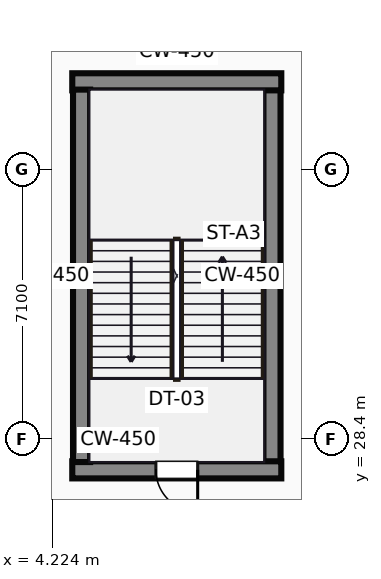
"""IFC4 building model, lengths in metres.
Left out: names, types, materials, properties, quantities, classifications, styles, units other than length and angle.
Written with IfcOpenShell. Run it as: python <this file> out.ifc"""

import sys

from ifc_helpers import new_model, si_unit, direction, frame, frame_2d, origin, place, context, subcontext, project, spatial, rectangle, extrude, source, transform, mapped, element, fill, save


model = new_model("IFC4")
c1 = context("Model", 3, precision=1e-05, world=origin(), true_north=direction((0.0, 1.0)))
c2 = subcontext(c1, "Body", "Model", "MODEL_VIEW")
j1 = project(units=[si_unit("LENGTHUNIT", "METRE"), si_unit("PLANEANGLEUNIT", "RADIAN")], contexts=[c1])
p1 = place(None, origin())
s1 = spatial("IfcSite", under=j1, at=p1, CompositionType="ELEMENT")
p2 = place(p1, origin())
s2 = spatial("IfcBuilding", under=s1, at=p2, CompositionType="ELEMENT")
p3 = place(p2, frame((0.0, 0.0, 16.0)))
s3 = spatial("IfcBuildingStorey", under=s2, at=p3, CompositionType="ELEMENT", Elevation=16.0)
m1 = source(origin(), c2, "Body", "SweptSolid", [
    extrude(rectangle(XDim=5.5, YDim=0.45, at=frame_2d((2.75, 0.0))), origin(), (0.0, 0.0, 1.0), 5.0),
])
p4 = place(p3, frame((4.75, 27.595, 0.0), z_axis=(0.0, 0.0, 1.0), x_axis=(1.0, 0.0, 0.0)))
e1 = element("IfcWall", 1, at=p4, inside=s3, PredefinedType="SHEAR", context=c2, shape_type="MappedRepresentation", body=[
    mapped(m1, transform((0.0, 0.0, 0.0))),
])
p5 = place(p4, frame((2.2, 0.0, 0.0)))
e2 = element("IfcOpeningElement", 2, at=p5, cuts=e1, PredefinedType="OPENING", context=c2, shape_type="SweptSolid", body=[
    extrude(rectangle(XDim=1.1, YDim=2.15, at=frame_2d((0.55, 1.075))), frame((0.0, 0.235, 0.0), z_axis=(0.0, -1.0, 0.0), x_axis=(1.0, 0.0, 0.0)), (0.0, 0.0, 1.0), 0.47),
])
m2 = source(origin(), c2, "Body", "SweptSolid", [
    extrude(rectangle(XDim=9.8, YDim=0.45, at=frame_2d((4.9, 0.0))), origin(), (0.0, 0.0, 1.0), 5.0),
])
for number, where, z_axis, x_axis in (
    (3, (4.995, 27.8, 0.0), (0.0, 0.0, 1.0), (0.0, 1.0, 0.0)),
    (4, (10.005, 27.8, 0.0), (0.0, 0.0, 1.0), (0.0, 1.0, 0.0)),
):
    element("IfcWall", number, at=place(p3, frame(where, z_axis=z_axis, x_axis=x_axis)), inside=s3, PredefinedType="SHEAR", context=c2, shape_type="MappedRepresentation", body=[
        mapped(m2, transform((0.0, 0.0, 0.0))),
    ])
p6 = place(p3, frame((4.75, 37.805, 0.0), z_axis=(0.0, 0.0, 1.0), x_axis=(1.0, 0.0, 0.0)))
e5 = element("IfcWall", 5, at=p6, inside=s3, PredefinedType="SHEAR", context=c2, shape_type="MappedRepresentation", body=[
    mapped(m1, transform((0.0, 0.0, 0.0))),
])
m3 = source(origin(), c2, "Body", "SweptSolid", [
    extrude(rectangle(XDim=1.1, YDim=2.15, at=frame_2d((0.55, 1.075))), frame((0.0, 0.025, 0.0), z_axis=(0.0, -1.0, 0.0), x_axis=(1.0, 0.0, 0.0)), (0.0, 0.0, 1.0), 0.05),
])
p7 = place(p5, origin())
e6 = element("IfcDoor", 6, at=p7, inside=s3, OperationType="SINGLE_SWING_RIGHT", PredefinedType="DOOR", context=c2, shape_type="MappedRepresentation", body=[
    mapped(m3, transform((0.0, 0.0, 0.0))),
])
fill(e2, e6)
save(model, sys.argv[1])
